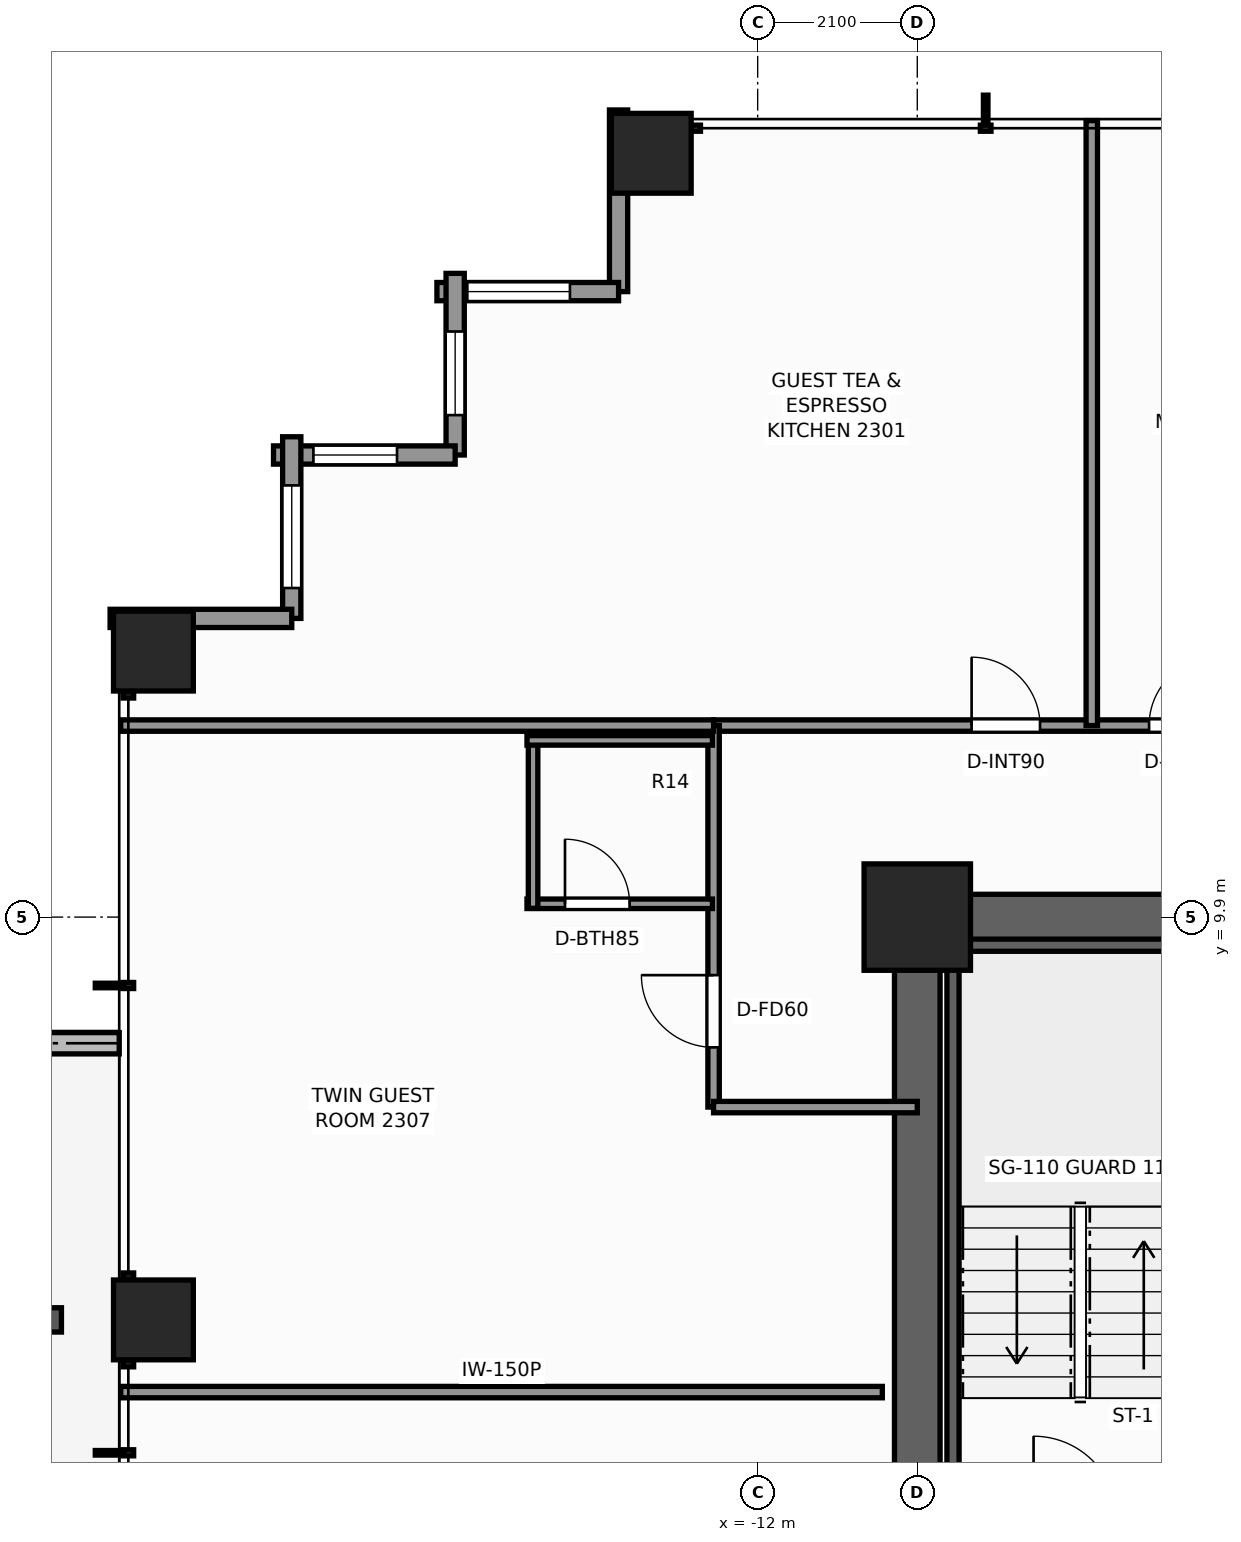
"""IFC4 building model, lengths in metres.
Left out: names, types, materials, properties, quantities, classifications, styles, units other than length and angle.
Written with IfcOpenShell. Run it as: python <this file> out.ifc"""

import sys

from ifc_helpers import new_model, si_unit, direction, frame, frame_2d, origin, origin_2d, place, context, subcontext, project, spatial, rectangle, extrude, element, fill, save


model = new_model("IFC4")
c1 = context("Model", 3, precision=1e-05, world=origin(), true_north=direction((0.0, 1.0)))
c2 = subcontext(c1, "Body", "Model", "MODEL_VIEW")
j1 = project(units=[si_unit("LENGTHUNIT", "METRE"), si_unit("PLANEANGLEUNIT", "RADIAN")], contexts=[c1])
p1 = place(None, origin())
s1 = spatial("IfcSite", under=j1, at=p1, CompositionType="ELEMENT")
p2 = place(p1, origin())
s2 = spatial("IfcBuilding", under=s1, at=p2, CompositionType="ELEMENT")
p3 = place(p2, frame((0.0, 0.0, 82.1)))
s3 = spatial("IfcBuildingStorey", under=s2, at=p3, CompositionType="ELEMENT", Elevation=82.1)
p4 = place(p3, frame((-10.2, 9.9, 0.0), z_axis=(0.0, 0.0, 1.0), x_axis=(1.0, 0.0, 0.0)))
e1 = element("IfcWall", 1, at=p4, inside=s3, PredefinedType="SHEAR", context=c2, shape_type="SweptSolid", body=[
    extrude(rectangle(XDim=14.62, YDim=0.6, at=frame_2d((7.31, 0.0))), origin(), (0.0, 0.0, 1.0), 3.3),
])
p5 = place(p3, frame((-9.9, -3.7, 0.0), z_axis=(0.0, 0.0, 1.0), x_axis=(0.0, 1.0, 0.0)))
e2 = element("IfcWall", 2, at=p5, inside=s3, PredefinedType="SHEAR", context=c2, shape_type="SweptSolid", body=[
    extrude(rectangle(XDim=13.3, YDim=0.6, at=frame_2d((6.65, 0.0))), origin(), (0.0, 0.0, 1.0), 3.3),
])
p6 = place(p5, frame((0.35, 0.0, 0.0)))
e3 = element("IfcOpeningElement", 3, at=p6, cuts=e2, PredefinedType="OPENING", context=c2, shape_type="SweptSolid", body=[
    extrude(rectangle(XDim=1.1, YDim=2.2, at=frame_2d((0.55, 1.1))), frame((0.0, 0.31, 0.0), z_axis=(0.0, -1.0, 0.0), x_axis=(1.0, 0.0, 0.0)), (0.0, 0.0, 1.0), 0.62),
])
p7 = place(p3, frame((-9.9, 9.9, 0.0), z_axis=(0.0, 0.0, 1.0), x_axis=(1.0, 0.0, 0.0)))
e4 = element("IfcColumn", 4, at=p7, inside=s3, PredefinedType="COLUMN", context=c2, shape_type="SweptSolid", body=[
    extrude(rectangle(XDim=1.4, YDim=1.4, at=origin_2d()), origin(), (0.0, 0.0, 1.0), 3.3),
])
for number, where, z_axis, x_axis in (
    (5, (-13.4, 19.95, 0.0), (0.0, 0.0, 1.0), (1.0, 0.0, 0.0)),
    (6, (-19.95, 4.6, 0.0), (0.0, 0.0, 1.0), (1.0, 0.0, 0.0)),
    (7, (-19.95, 13.4, 0.0), (0.0, 0.0, 1.0), (1.0, 0.0, 0.0)),
):
    element("IfcColumn", number, at=place(p3, frame(where, z_axis=z_axis, x_axis=x_axis)), inside=s3, PredefinedType="COLUMN", context=c2, shape_type="SweptSolid", body=[
        extrude(rectangle(XDim=1.05, YDim=1.05, at=origin_2d()), origin(), (0.0, 0.0, 1.0), 3.3),
    ])
p8 = place(p3, frame((-20.4, 8.24, -0.04), z_axis=(0.0, 0.0, 1.0), x_axis=(-1.0, 0.0, 0.0)))
e8 = element("IfcWall", 8, at=p8, inside=s3, PredefinedType="PARAPET", context=c2, shape_type="SweptSolid", body=[
    extrude(rectangle(XDim=3.214, YDim=0.28, at=frame_2d((1.607, 0.0))), origin(), (0.0, 0.0, 1.0), 0.42),
])
p9 = place(p3, frame((-13.83, 18.13, 0.0), z_axis=(0.0, 0.0, 1.0), x_axis=(0.0, 1.0, 0.0)))
e9 = element("IfcWall", 9, at=p9, inside=s3, PredefinedType="STANDARD", context=c2, shape_type="SweptSolid", body=[
    extrude(rectangle(XDim=2.39, YDim=0.24, at=frame_2d((1.195, 0.0))), origin(), (0.0, 0.0, 1.0), 2.459),
])
p10 = place(p3, frame((-16.22, 18.13, 0.0), z_axis=(0.0, 0.0, 1.0), x_axis=(1.0, 0.0, 0.0)))
e10 = element("IfcWall", 10, at=p10, inside=s3, PredefinedType="STANDARD", context=c2, shape_type="SweptSolid", body=[
    extrude(rectangle(XDim=2.39, YDim=0.24, at=frame_2d((1.195, 0.0))), origin(), (0.0, 0.0, 1.0), 2.459),
])
p11 = place(p10, frame((0.4, 0.0, 0.65)))
e11 = element("IfcOpeningElement", 11, at=p11, cuts=e10, PredefinedType="OPENING", context=c2, shape_type="SweptSolid", body=[
    extrude(rectangle(XDim=1.35, YDim=1.55, at=frame_2d((0.675, 0.775))), frame((0.0, 0.13, 0.0), z_axis=(0.0, -1.0, 0.0), x_axis=(1.0, 0.0, 0.0)), (0.0, 0.0, 1.0), 0.26),
])
p12 = place(p3, frame((-15.98, 15.98, 0.0), z_axis=(0.0, 0.0, 1.0), x_axis=(0.0, 1.0, 0.0)))
e12 = element("IfcWall", 12, at=p12, inside=s3, PredefinedType="STANDARD", context=c2, shape_type="SweptSolid", body=[
    extrude(rectangle(XDim=2.39, YDim=0.24, at=frame_2d((1.195, 0.0))), origin(), (0.0, 0.0, 1.0), 2.459),
])
p13 = place(p12, frame((0.525, 0.0, 0.65)))
e13 = element("IfcOpeningElement", 13, at=p13, cuts=e12, PredefinedType="OPENING", context=c2, shape_type="SweptSolid", body=[
    extrude(rectangle(XDim=1.1, YDim=1.45, at=frame_2d((0.55, 0.725))), frame((0.0, 0.13, 0.0), z_axis=(0.0, -1.0, 0.0), x_axis=(1.0, 0.0, 0.0)), (0.0, 0.0, 1.0), 0.26),
])
p14 = place(p3, frame((-18.37, 15.98, 0.0), z_axis=(0.0, 0.0, 1.0), x_axis=(1.0, 0.0, 0.0)))
e14 = element("IfcWall", 14, at=p14, inside=s3, PredefinedType="STANDARD", context=c2, shape_type="SweptSolid", body=[
    extrude(rectangle(XDim=2.39, YDim=0.24, at=frame_2d((1.195, 0.0))), origin(), (0.0, 0.0, 1.0), 2.459),
])
p15 = place(p14, frame((0.525, 0.0, 0.65)))
e15 = element("IfcOpeningElement", 15, at=p15, cuts=e14, PredefinedType="OPENING", context=c2, shape_type="SweptSolid", body=[
    extrude(rectangle(XDim=1.1, YDim=1.45, at=frame_2d((0.55, 0.725))), frame((0.0, 0.13, 0.0), z_axis=(0.0, -1.0, 0.0), x_axis=(1.0, 0.0, 0.0)), (0.0, 0.0, 1.0), 0.26),
])
p16 = place(p3, frame((-18.13, 13.83, 0.0), z_axis=(0.0, 0.0, 1.0), x_axis=(0.0, 1.0, 0.0)))
e16 = element("IfcWall", 16, at=p16, inside=s3, PredefinedType="STANDARD", context=c2, shape_type="SweptSolid", body=[
    extrude(rectangle(XDim=2.39, YDim=0.24, at=frame_2d((1.195, 0.0))), origin(), (0.0, 0.0, 1.0), 2.459),
])
p17 = place(p16, frame((0.4, 0.0, 0.65)))
e17 = element("IfcOpeningElement", 17, at=p17, cuts=e16, PredefinedType="OPENING", context=c2, shape_type="SweptSolid", body=[
    extrude(rectangle(XDim=1.35, YDim=1.55, at=frame_2d((0.675, 0.775))), frame((0.0, 0.13, 0.0), z_axis=(0.0, -1.0, 0.0), x_axis=(1.0, 0.0, 0.0)), (0.0, 0.0, 1.0), 0.26),
])
p18 = place(p3, frame((-20.52, 13.83, 0.0), z_axis=(0.0, 0.0, 1.0), x_axis=(1.0, 0.0, 0.0)))
e18 = element("IfcWall", 18, at=p18, inside=s3, PredefinedType="STANDARD", context=c2, shape_type="SweptSolid", body=[
    extrude(rectangle(XDim=2.39, YDim=0.24, at=frame_2d((1.195, 0.0))), origin(), (0.0, 0.0, 1.0), 2.459),
])
p19 = place(p3, frame((-9.52, 9.53, 0.0), z_axis=(0.0, 0.0, 1.0), x_axis=(1.0, 0.0, 0.0)))
e19 = element("IfcWall", 19, at=p19, inside=s3, PredefinedType="SHEAR", context=c2, shape_type="SweptSolid", body=[
    extrude(rectangle(XDim=3.52, YDim=0.16, at=frame_2d((1.76, 0.0))), origin(), (0.0, 0.0, 1.0), 3.3),
])
p20 = place(p3, frame((-9.43, 1.97, 0.0), z_axis=(0.0, 0.0, 1.0), x_axis=(0.0, 1.0, 0.0)))
e20 = element("IfcWall", 20, at=p20, inside=s3, PredefinedType="SHEAR", context=c2, shape_type="SweptSolid", body=[
    extrude(rectangle(XDim=7.56, YDim=0.16, at=frame_2d((3.78, 0.0))), origin(), (0.0, 0.0, 1.0), 3.3),
])
p21 = place(p3, frame((-12.58, 12.42, 0.0), z_axis=(0.0, 0.0, 1.0), x_axis=(1.0, 0.0, 0.0)))
e21 = element("IfcWall", 21, at=p21, inside=s3, PredefinedType="PARTITIONING", context=c2, shape_type="SweptSolid", body=[
    extrude(rectangle(XDim=25.16, YDim=0.15, at=frame_2d((12.58, 0.0))), origin(), (0.0, 0.0, 1.0), 2.292),
])
p22 = place(p21, frame((3.395, 0.0, 0.0)))
e22 = element("IfcOpeningElement", 22, at=p22, cuts=e21, PredefinedType="OPENING", context=c2, shape_type="SweptSolid", body=[
    extrude(rectangle(XDim=0.9, YDim=2.06, at=frame_2d((0.45, 1.03))), frame((0.0, 0.085, 0.0), z_axis=(0.0, -1.0, 0.0), x_axis=(1.0, 0.0, 0.0)), (0.0, 0.0, 1.0), 0.17),
])
p23 = place(p21, frame((5.73, 0.0, 0.0)))
e23 = element("IfcOpeningElement", 23, at=p23, cuts=e21, PredefinedType="OPENING", context=c2, shape_type="SweptSolid", body=[
    extrude(rectangle(XDim=0.9, YDim=2.06, at=frame_2d((0.45, 1.03))), frame((0.0, 0.085, 0.0), z_axis=(0.0, -1.0, 0.0), x_axis=(1.0, 0.0, 0.0)), (0.0, 0.0, 1.0), 0.17),
])
p24 = place(p21, frame((9.208, 0.0, 0.0)))
e24 = element("IfcOpeningElement", 24, at=p24, cuts=e21, PredefinedType="OPENING", context=c2, shape_type="SweptSolid", body=[
    extrude(rectangle(XDim=0.9, YDim=2.06, at=frame_2d((0.45, 1.03))), frame((0.0, 0.085, 0.0), z_axis=(0.0, -1.0, 0.0), x_axis=(1.0, 0.0, 0.0)), (0.0, 0.0, 1.0), 0.17),
])
p25 = place(p21, frame((11.208, 0.0, 0.0)))
e25 = element("IfcOpeningElement", 25, at=p25, cuts=e21, PredefinedType="OPENING", context=c2, shape_type="SweptSolid", body=[
    extrude(rectangle(XDim=0.95, YDim=2.06, at=frame_2d((0.475, 1.03))), frame((0.0, 0.085, 0.0), z_axis=(0.0, -1.0, 0.0), x_axis=(1.0, 0.0, 0.0)), (0.0, 0.0, 1.0), 0.17),
])
p26 = place(p21, frame((18.53, 0.0, 0.0)))
e26 = element("IfcOpeningElement", 26, at=p26, cuts=e21, PredefinedType="OPENING", context=c2, shape_type="SweptSolid", body=[
    extrude(rectangle(XDim=0.9, YDim=2.06, at=frame_2d((0.45, 1.03))), frame((0.0, 0.085, 0.0), z_axis=(0.0, -1.0, 0.0), x_axis=(1.0, 0.0, 0.0)), (0.0, 0.0, 1.0), 0.17),
])
p27 = place(p21, frame((20.777, 0.0, 0.0)))
e27 = element("IfcOpeningElement", 27, at=p27, cuts=e21, PredefinedType="OPENING", context=c2, shape_type="SweptSolid", body=[
    extrude(rectangle(XDim=0.95, YDim=2.06, at=frame_2d((0.475, 1.03))), frame((0.0, 0.085, 0.0), z_axis=(0.0, -1.0, 0.0), x_axis=(1.0, 0.0, 0.0)), (0.0, 0.0, 1.0), 0.17),
])
p28 = place(p3, frame((-12.58, 7.4, 0.0), z_axis=(0.0, 0.0, 1.0), x_axis=(0.0, 1.0, 0.0)))
e28 = element("IfcWall", 28, at=p28, inside=s3, PredefinedType="PARTITIONING", context=c2, shape_type="SweptSolid", body=[
    extrude(rectangle(XDim=5.02, YDim=0.15, at=frame_2d((2.51, 0.0))), origin(), (0.0, 0.0, 1.0), 2.292),
])
p29 = place(p28, frame((0.786, 0.0, 0.0)))
e29 = element("IfcOpeningElement", 29, at=p29, cuts=e28, PredefinedType="OPENING", context=c2, shape_type="SweptSolid", body=[
    extrude(rectangle(XDim=0.95, YDim=2.06, at=frame_2d((0.475, 1.03))), frame((0.0, 0.085, 0.0), z_axis=(0.0, -1.0, 0.0), x_axis=(1.0, 0.0, 0.0)), (0.0, 0.0, 1.0), 0.17),
])
p30 = place(p3, frame((-12.58, 7.4, 0.0), z_axis=(0.0, 0.0, 1.0), x_axis=(1.0, 0.0, 0.0)))
e30 = element("IfcWall", 30, at=p30, inside=s3, PredefinedType="PARTITIONING", context=c2, shape_type="SweptSolid", body=[
    extrude(rectangle(XDim=2.68, YDim=0.15, at=frame_2d((1.34, 0.0))), origin(), (0.0, 0.0, 1.0), 3.08),
])
p31 = place(p3, frame((-20.38, 12.42, 0.0), z_axis=(0.0, 0.0, 1.0), x_axis=(1.0, 0.0, 0.0)))
e31 = element("IfcWall", 31, at=p31, inside=s3, PredefinedType="PARTITIONING", context=c2, shape_type="SweptSolid", body=[
    extrude(rectangle(XDim=7.8, YDim=0.15, at=frame_2d((3.9, 0.0))), origin(), (0.0, 0.0, 1.0), 2.292),
])
p32 = place(p3, frame((-7.604, 12.42, 0.0), z_axis=(0.0, 0.0, 1.0), x_axis=(0.0, 1.0, 0.0)))
e32 = element("IfcWall", 32, at=p32, inside=s3, PredefinedType="PARTITIONING", context=c2, shape_type="SweptSolid", body=[
    extrude(rectangle(XDim=7.96, YDim=0.15, at=frame_2d((3.98, 0.0))), origin(), (0.0, 0.0, 1.0), 2.449),
])
p33 = place(p3, frame((-20.38, 3.65, 0.0), z_axis=(0.0, 0.0, 1.0), x_axis=(1.0, 0.0, 0.0)))
e33 = element("IfcWall", 33, at=p33, inside=s3, PredefinedType="PARTITIONING", context=c2, shape_type="SweptSolid", body=[
    extrude(rectangle(XDim=10.02, YDim=0.15, at=frame_2d((5.01, 0.0))), origin(), (0.0, 0.0, 1.0), 2.449),
])
p34 = place(p3, frame((-15.035, 10.075, 0.0), z_axis=(0.0, 0.0, 1.0), x_axis=(1.0, 0.0, 0.0)))
e34 = element("IfcWall", 34, at=p34, inside=s3, PredefinedType="PARTITIONING", context=c2, shape_type="SweptSolid", body=[
    extrude(rectangle(XDim=2.44, YDim=0.125, at=frame_2d((1.22, 0.0))), origin(), (0.0, 0.0, 1.0), 3.08),
])
p35 = place(p34, frame((0.5, 0.0, 0.0)))
e35 = element("IfcOpeningElement", 35, at=p35, cuts=e34, PredefinedType="OPENING", context=c2, shape_type="SweptSolid", body=[
    extrude(rectangle(XDim=0.85, YDim=2.03, at=frame_2d((0.425, 1.015))), frame((0.0, 0.073, 0.0), z_axis=(0.0, -1.0, 0.0), x_axis=(1.0, 0.0, 0.0)), (0.0, 0.0, 1.0), 0.145),
])
p36 = place(p3, frame((-14.955, 10.015, 0.0), z_axis=(0.0, 0.0, 1.0), x_axis=(0.0, 1.0, 0.0)))
e36 = element("IfcWall", 36, at=p36, inside=s3, PredefinedType="PARTITIONING", context=c2, shape_type="SweptSolid", body=[
    extrude(rectangle(XDim=2.27, YDim=0.125, at=frame_2d((1.135, 0.0))), origin(), (0.0, 0.0, 1.0), 2.292),
])
p37 = place(p3, frame((-15.035, 12.225, 0.0), z_axis=(0.0, 0.0, 1.0), x_axis=(1.0, 0.0, 0.0)))
e37 = element("IfcWall", 37, at=p37, inside=s3, PredefinedType="PARTITIONING", context=c2, shape_type="SweptSolid", body=[
    extrude(rectangle(XDim=2.44, YDim=0.125, at=frame_2d((1.22, 0.0))), origin(), (0.0, 0.0, 1.0), 3.08),
])
p38 = place(p11, origin())
e38 = element("IfcWindow", 38, at=p38, inside=s3, PartitioningType="SINGLE_PANEL", PredefinedType="WINDOW", context=c2, shape_type="SweptSolid", body=[
    extrude(rectangle(XDim=1.35, YDim=1.55, at=frame_2d((0.675, 0.775))), frame((0.0, 0.03, 0.0), z_axis=(0.0, -1.0, 0.0), x_axis=(1.0, 0.0, 0.0)), (0.0, 0.0, 1.0), 0.06),
])
fill(e11, e38)
p39 = place(p13, origin())
e39 = element("IfcWindow", 39, at=p39, inside=s3, PartitioningType="SINGLE_PANEL", PredefinedType="WINDOW", context=c2, shape_type="SweptSolid", body=[
    extrude(rectangle(XDim=1.1, YDim=1.45, at=frame_2d((0.55, 0.725))), frame((0.0, 0.03, 0.0), z_axis=(0.0, -1.0, 0.0), x_axis=(1.0, 0.0, 0.0)), (0.0, 0.0, 1.0), 0.06),
])
fill(e13, e39)
p40 = place(p15, origin())
e40 = element("IfcWindow", 40, at=p40, inside=s3, PartitioningType="SINGLE_PANEL", PredefinedType="WINDOW", context=c2, shape_type="SweptSolid", body=[
    extrude(rectangle(XDim=1.1, YDim=1.45, at=frame_2d((0.55, 0.725))), frame((0.0, 0.03, 0.0), z_axis=(0.0, -1.0, 0.0), x_axis=(1.0, 0.0, 0.0)), (0.0, 0.0, 1.0), 0.06),
])
fill(e15, e40)
p41 = place(p17, origin())
e41 = element("IfcWindow", 41, at=p41, inside=s3, PartitioningType="SINGLE_PANEL", PredefinedType="WINDOW", context=c2, shape_type="SweptSolid", body=[
    extrude(rectangle(XDim=1.35, YDim=1.55, at=frame_2d((0.675, 0.775))), frame((0.0, 0.03, 0.0), z_axis=(0.0, -1.0, 0.0), x_axis=(1.0, 0.0, 0.0)), (0.0, 0.0, 1.0), 0.06),
])
fill(e17, e41)
p42 = place(p22, origin())
e42 = element("IfcDoor", 42, at=p42, inside=s3, OperationType="SINGLE_SWING_LEFT", PredefinedType="DOOR", context=c2, shape_type="SweptSolid", body=[
    extrude(rectangle(XDim=0.9, YDim=2.06, at=frame_2d((0.45, 1.03))), frame((0.0, 0.025, 0.0), z_axis=(0.0, -1.0, 0.0), x_axis=(1.0, 0.0, 0.0)), (0.0, 0.0, 1.0), 0.05),
])
fill(e22, e42)
p43 = place(p23, origin())
e43 = element("IfcDoor", 43, at=p43, inside=s3, OperationType="SINGLE_SWING_RIGHT", PredefinedType="DOOR", context=c2, shape_type="SweptSolid", body=[
    extrude(rectangle(XDim=0.9, YDim=2.06, at=frame_2d((0.45, 1.03))), frame((0.0, 0.025, 0.0), z_axis=(0.0, -1.0, 0.0), x_axis=(1.0, 0.0, 0.0)), (0.0, 0.0, 1.0), 0.05),
])
fill(e23, e43)
p44 = place(p35, origin())
e44 = element("IfcDoor", 44, at=p44, inside=s3, OperationType="SINGLE_SWING_LEFT", PredefinedType="DOOR", context=c2, shape_type="SweptSolid", body=[
    extrude(rectangle(XDim=0.85, YDim=2.03, at=frame_2d((0.425, 1.015))), frame((0.0, 0.025, 0.0), z_axis=(0.0, -1.0, 0.0), x_axis=(1.0, 0.0, 0.0)), (0.0, 0.0, 1.0), 0.05),
])
fill(e35, e44)
p45 = place(p29, origin())
e45 = element("IfcDoor", 45, at=p45, inside=s3, OperationType="SINGLE_SWING_RIGHT", PredefinedType="DOOR", context=c2, shape_type="SweptSolid", body=[
    extrude(rectangle(XDim=0.95, YDim=2.06, at=frame_2d((0.475, 1.03))), frame((0.0, 0.025, 0.0), z_axis=(0.0, -1.0, 0.0), x_axis=(1.0, 0.0, 0.0)), (0.0, 0.0, 1.0), 0.05),
])
fill(e29, e45)
save(model, sys.argv[1])
